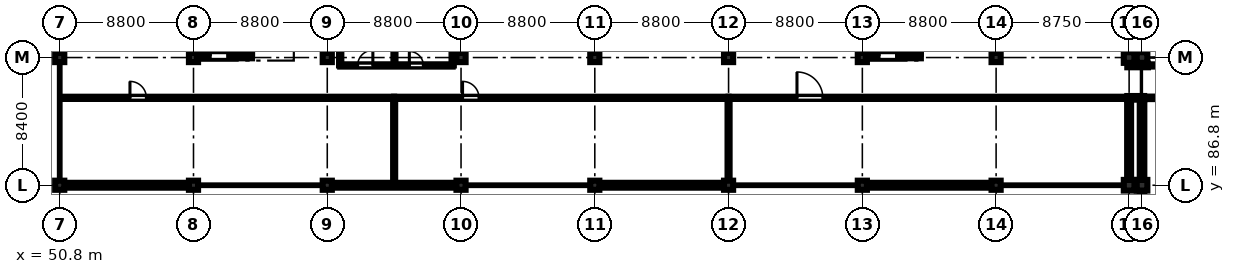
"""IFC4 building model, lengths in metres.
Left out: names, types, materials, properties, quantities, classifications, styles, units other than length and angle.
Written with IfcOpenShell. Run it as: python <this file> out.ifc"""

import sys

from ifc_helpers import new_model, si_unit, direction, frame, frame_2d, origin, origin_2d, place, context, subcontext, project, spatial, rectangle, extrude, element, fill, save


model = new_model("IFC4")
c1 = context("Model", 3, precision=1e-05, world=origin(), true_north=direction((0.0, 1.0)))
c2 = subcontext(c1, "Body", "Model", "MODEL_VIEW")
j1 = project(units=[si_unit("LENGTHUNIT", "METRE"), si_unit("PLANEANGLEUNIT", "RADIAN")], contexts=[c1])
p1 = place(None, origin())
s1 = spatial("IfcSite", under=j1, at=p1, CompositionType="ELEMENT")
p2 = place(p1, origin())
s2 = spatial("IfcBuilding", under=s1, at=p2, CompositionType="ELEMENT")
p3 = place(p2, frame((0.0, 0.0, 10.2)))
s3 = spatial("IfcBuildingStorey", under=s2, at=p3, CompositionType="ELEMENT", Elevation=10.2)
for number, where, z_axis, x_axis in (
    (1, (50.8, 86.8, 0.0), (0.0, 0.0, 1.0), (1.0, 0.0, 0.0)),
    (2, (50.8, 95.2, 0.0), (0.0, 0.0, 1.0), (1.0, 0.0, 0.0)),
    (3, (59.6, 86.8, 0.0), (0.0, 0.0, 1.0), (1.0, 0.0, 0.0)),
    (4, (59.6, 95.2, 0.0), (0.0, 0.0, 1.0), (1.0, 0.0, 0.0)),
    (5, (68.4, 86.8, 0.0), (0.0, 0.0, 1.0), (1.0, 0.0, 0.0)),
    (6, (68.4, 95.2, 0.0), (0.0, 0.0, 1.0), (1.0, 0.0, 0.0)),
    (7, (77.2, 86.8, 0.0), (0.0, 0.0, 1.0), (1.0, 0.0, 0.0)),
    (8, (77.2, 95.2, 0.0), (0.0, 0.0, 1.0), (1.0, 0.0, 0.0)),
    (9, (86.0, 86.8, 0.0), (0.0, 0.0, 1.0), (1.0, 0.0, 0.0)),
    (10, (86.0, 95.2, 0.0), (0.0, 0.0, 1.0), (1.0, 0.0, 0.0)),
    (11, (94.8, 86.8, 0.0), (0.0, 0.0, 1.0), (1.0, 0.0, 0.0)),
    (12, (94.8, 95.2, 0.0), (0.0, 0.0, 1.0), (1.0, 0.0, 0.0)),
    (13, (103.6, 86.8, 0.0), (0.0, 0.0, 1.0), (1.0, 0.0, 0.0)),
    (14, (103.6, 95.2, 0.0), (0.0, 0.0, 1.0), (1.0, 0.0, 0.0)),
    (15, (112.4, 86.8, 0.0), (0.0, 0.0, 1.0), (1.0, 0.0, 0.0)),
    (16, (112.4, 95.2, 0.0), (0.0, 0.0, 1.0), (1.0, 0.0, 0.0)),
):
    element("IfcColumn", number, at=place(p3, frame(where, z_axis=z_axis, x_axis=x_axis)), inside=s3, PredefinedType="COLUMN", context=c2, shape_type="SweptSolid", body=[
        extrude(rectangle(XDim=0.6, YDim=0.6, at=origin_2d()), origin(), (0.0, 0.0, 1.0), 4.26),
    ])
for number, where, z_axis, x_axis in (
    (17, (121.15, 86.8, 0.0), (0.0, 0.0, 1.0), (1.0, 0.0, 0.0)),
    (18, (121.15, 95.2, 0.0), (0.0, 0.0, 1.0), (1.0, 0.0, 0.0)),
    (19, (122.0, 86.8, 0.0), (0.0, 0.0, 1.0), (1.0, 0.0, 0.0)),
    (20, (122.0, 95.2, 0.0), (0.0, 0.0, 1.0), (1.0, 0.0, 0.0)),
):
    element("IfcColumn", number, at=place(p3, frame(where, z_axis=z_axis, x_axis=x_axis)), inside=s3, PredefinedType="COLUMN", context=c2, shape_type="SweptSolid", body=[
        extrude(rectangle(XDim=0.7, YDim=0.7, at=origin_2d()), origin(), (0.0, 0.0, 1.0), 4.26),
    ])
p4 = place(p3, frame((59.75, 95.3, 0.0), z_axis=(0.0, 0.0, 1.0), x_axis=(1.0, 0.0, 0.0)))
e21 = element("IfcWall", 21, at=p4, inside=s3, PredefinedType="SHEAR", context=c2, shape_type="SweptSolid", body=[
    extrude(rectangle(XDim=3.7, YDim=0.3, at=frame_2d((1.85, 0.0))), origin(), (0.0, 0.0, 1.0), 4.26),
])
p5 = place(p4, frame((0.95, 0.0, 0.0)))
e22 = element("IfcOpeningElement", 22, at=p5, cuts=e21, PredefinedType="OPENING", context=c2, shape_type="SweptSolid", body=[
    extrude(rectangle(XDim=1.15, YDim=2.15, at=frame_2d((0.575, 1.075))), frame((0.0, 0.16, 0.0), z_axis=(0.0, -1.0, 0.0), x_axis=(1.0, 0.0, 0.0)), (0.0, 0.0, 1.0), 0.32),
])
for number, where, z_axis, x_axis in (
    (23, (59.9, 95.45, 0.0), (0.0, 0.0, 1.0), (0.0, 1.0, 0.0)),
    (24, (63.3, 95.45, 0.0), (0.0, 0.0, 1.0), (0.0, 1.0, 0.0)),
):
    element("IfcWall", number, at=place(p3, frame(where, z_axis=z_axis, x_axis=x_axis)), inside=s3, PredefinedType="SHEAR", context=c2, shape_type="SweptSolid", body=[
        extrude(rectangle(XDim=7.9, YDim=0.3, at=frame_2d((3.95, 0.0))), origin(), (0.0, 0.0, 1.0), 4.26),
    ])
p6 = place(p3, frame((103.75, 95.3, 0.0), z_axis=(0.0, 0.0, 1.0), x_axis=(1.0, 0.0, 0.0)))
e25 = element("IfcWall", 25, at=p6, inside=s3, PredefinedType="SHEAR", context=c2, shape_type="SweptSolid", body=[
    extrude(rectangle(XDim=3.7, YDim=0.3, at=frame_2d((1.85, 0.0))), origin(), (0.0, 0.0, 1.0), 4.26),
])
p7 = place(p6, frame((0.95, 0.0, 0.0)))
e26 = element("IfcOpeningElement", 26, at=p7, cuts=e25, PredefinedType="OPENING", context=c2, shape_type="SweptSolid", body=[
    extrude(rectangle(XDim=1.15, YDim=2.15, at=frame_2d((0.575, 1.075))), frame((0.0, 0.16, 0.0), z_axis=(0.0, -1.0, 0.0), x_axis=(1.0, 0.0, 0.0)), (0.0, 0.0, 1.0), 0.32),
])
for number, where, z_axis, x_axis in (
    (27, (103.9, 95.45, 0.0), (0.0, 0.0, 1.0), (0.0, 1.0, 0.0)),
    (28, (107.3, 95.45, 0.0), (0.0, 0.0, 1.0), (0.0, 1.0, 0.0)),
):
    element("IfcWall", number, at=place(p3, frame(where, z_axis=z_axis, x_axis=x_axis)), inside=s3, PredefinedType="SHEAR", context=c2, shape_type="SweptSolid", body=[
        extrude(rectangle(XDim=7.9, YDim=0.3, at=frame_2d((3.95, 0.0))), origin(), (0.0, 0.0, 1.0), 4.26),
    ])
p8 = place(p3, frame((59.3, 86.8, 0.0), z_axis=(0.0, 0.0, 1.0), x_axis=(-1.0, 0.0, 0.0)))
e29 = element("IfcWall", 29, at=p8, inside=s3, PredefinedType="STANDARD", context=c2, shape_type="SweptSolid", body=[
    extrude(rectangle(XDim=8.2, YDim=0.32, at=frame_2d((4.1, 0.0))), origin(), (0.0, 0.0, 1.0), 3.61),
])
p9 = place(p8, frame((2.8, 0.0, 0.95)))
e30 = element("IfcOpeningElement", 30, at=p9, cuts=e29, PredefinedType="OPENING", context=c2, shape_type="SweptSolid", body=[
    extrude(rectangle(XDim=1.95, YDim=2.15, at=frame_2d((0.975, 1.075))), frame((0.0, 0.17, 0.0), z_axis=(0.0, -1.0, 0.0), x_axis=(1.0, 0.0, 0.0)), (0.0, 0.0, 1.0), 0.34),
])
p10 = place(p3, frame((76.9, 86.8, 0.0), z_axis=(0.0, 0.0, 1.0), x_axis=(-1.0, 0.0, 0.0)))
e31 = element("IfcWall", 31, at=p10, inside=s3, PredefinedType="STANDARD", context=c2, shape_type="SweptSolid", body=[
    extrude(rectangle(XDim=8.2, YDim=0.32, at=frame_2d((4.1, 0.0))), origin(), (0.0, 0.0, 1.0), 3.61),
])
p11 = place(p10, frame((1.2, 0.0, 0.95)))
e32 = element("IfcOpeningElement", 32, at=p11, cuts=e31, PredefinedType="OPENING", context=c2, shape_type="SweptSolid", body=[
    extrude(rectangle(XDim=1.95, YDim=2.15, at=frame_2d((0.975, 1.075))), frame((0.0, 0.17, 0.0), z_axis=(0.0, -1.0, 0.0), x_axis=(1.0, 0.0, 0.0)), (0.0, 0.0, 1.0), 0.34),
])
p12 = place(p3, frame((94.5, 86.8, 0.0), z_axis=(0.0, 0.0, 1.0), x_axis=(-1.0, 0.0, 0.0)))
e33 = element("IfcWall", 33, at=p12, inside=s3, PredefinedType="STANDARD", context=c2, shape_type="SweptSolid", body=[
    extrude(rectangle(XDim=8.2, YDim=0.32, at=frame_2d((4.1, 0.0))), origin(), (0.0, 0.0, 1.0), 3.61),
])
p13 = place(p12, frame((2.8, 0.0, 0.95)))
e34 = element("IfcOpeningElement", 34, at=p13, cuts=e33, PredefinedType="OPENING", context=c2, shape_type="SweptSolid", body=[
    extrude(rectangle(XDim=1.95, YDim=2.15, at=frame_2d((0.975, 1.075))), frame((0.0, 0.17, 0.0), z_axis=(0.0, -1.0, 0.0), x_axis=(1.0, 0.0, 0.0)), (0.0, 0.0, 1.0), 0.34),
])
p14 = place(p3, frame((112.1, 86.8, 0.0), z_axis=(0.0, 0.0, 1.0), x_axis=(-1.0, 0.0, 0.0)))
e35 = element("IfcWall", 35, at=p14, inside=s3, PredefinedType="STANDARD", context=c2, shape_type="SweptSolid", body=[
    extrude(rectangle(XDim=8.2, YDim=0.32, at=frame_2d((4.1, 0.0))), origin(), (0.0, 0.0, 1.0), 3.61),
])
p15 = place(p14, frame((2.8, 0.0, 0.95)))
e36 = element("IfcOpeningElement", 36, at=p15, cuts=e35, PredefinedType="OPENING", context=c2, shape_type="SweptSolid", body=[
    extrude(rectangle(XDim=1.95, YDim=2.15, at=frame_2d((0.975, 1.075))), frame((0.0, 0.17, 0.0), z_axis=(0.0, -1.0, 0.0), x_axis=(1.0, 0.0, 0.0)), (0.0, 0.0, 1.0), 0.34),
])
p16 = place(p3, frame((121.15, 92.42, 0.0), z_axis=(0.0, 0.0, 1.0), x_axis=(0.0, -1.0, 0.0)))
e37 = element("IfcWall", 37, at=p16, inside=s3, PredefinedType="STANDARD", context=c2, shape_type="SweptSolid", body=[
    extrude(rectangle(XDim=5.27, YDim=0.26, at=frame_2d((2.635, 0.0))), origin(), (0.0, 0.0, 1.0), 3.61),
])
p17 = place(p3, frame((121.15, 103.25, 0.0), z_axis=(0.0, 0.0, 1.0), x_axis=(0.0, -1.0, 0.0)))
e38 = element("IfcWall", 38, at=p17, inside=s3, PredefinedType="STANDARD", context=c2, shape_type="SweptSolid", body=[
    extrude(rectangle(XDim=7.7, YDim=0.26, at=frame_2d((3.85, 0.0))), origin(), (0.0, 0.0, 1.0), 3.61),
])
p18 = place(p3, frame((122.0, 78.75, 0.0), z_axis=(0.0, 0.0, 1.0), x_axis=(0.0, 1.0, 0.0)))
e39 = element("IfcWall", 39, at=p18, inside=s3, PredefinedType="STANDARD", context=c2, shape_type="SweptSolid", body=[
    extrude(rectangle(XDim=7.7, YDim=0.3, at=frame_2d((3.85, 0.0))), origin(), (0.0, 0.0, 1.0), 3.51),
])
p19 = place(p3, frame((122.0, 87.15, 0.0), z_axis=(0.0, 0.0, 1.0), x_axis=(0.0, 1.0, 0.0)))
e40 = element("IfcWall", 40, at=p19, inside=s3, PredefinedType="STANDARD", context=c2, shape_type="SweptSolid", body=[
    extrude(rectangle(XDim=5.27, YDim=0.3, at=frame_2d((2.635, 0.0))), origin(), (0.0, 0.0, 1.0), 3.51),
])
p20 = place(p3, frame((122.14, 92.55, 0.0), z_axis=(0.0, 0.0, 1.0), x_axis=(-1.0, 0.0, 0.0)))
e41 = element("IfcWall", 41, at=p20, inside=s3, PredefinedType="STANDARD", context=c2, shape_type="SweptSolid", body=[
    extrude(rectangle(XDim=1.11, YDim=0.24, at=frame_2d((0.555, 0.0))), origin(), (0.0, 0.0, 1.0), 4.26),
])
p21 = place(p3, frame((121.03, 94.68, 0.0), z_axis=(0.0, 0.0, 1.0), x_axis=(1.0, 0.0, 0.0)))
e42 = element("IfcWall", 42, at=p21, inside=s3, PredefinedType="STANDARD", context=c2, shape_type="SweptSolid", body=[
    extrude(rectangle(XDim=1.36, YDim=0.24, at=frame_2d((0.68, 0.0))), origin(), (0.0, 0.0, 1.0), 4.26),
])
p22 = place(p3, frame((122.0, 95.55, 0.0), z_axis=(0.0, 0.0, 1.0), x_axis=(0.0, 1.0, 0.0)))
e43 = element("IfcWall", 43, at=p22, inside=s3, PredefinedType="STANDARD", context=c2, shape_type="SweptSolid", body=[
    extrude(rectangle(XDim=7.7, YDim=0.3, at=frame_2d((3.85, 0.0))), origin(), (0.0, 0.0, 1.0), 3.51),
])
p23 = place(p3, frame((69.25, 94.68, 0.0), z_axis=(0.0, 0.0, 1.0), x_axis=(1.0, 0.0, 0.0)))
e44 = element("IfcWall", 44, at=p23, inside=s3, PredefinedType="PARTITIONING", context=c2, shape_type="SweptSolid", body=[
    extrude(rectangle(XDim=7.4, YDim=0.15, at=frame_2d((3.7, 0.0))), origin(), (0.0, 0.0, 1.0), 4.26),
])
p24 = place(p23, frame((1.15, 0.0, 0.0)))
e45 = element("IfcOpeningElement", 45, at=p24, cuts=e44, PredefinedType="OPENING", context=c2, shape_type="SweptSolid", body=[
    extrude(rectangle(XDim=1.0, YDim=2.12, at=frame_2d((0.5, 1.06))), frame((0.0, 0.085, 0.0), z_axis=(0.0, -1.0, 0.0), x_axis=(1.0, 0.0, 0.0)), (0.0, 0.0, 1.0), 0.17),
])
p25 = place(p23, frame((4.55, 0.0, 0.0)))
e46 = element("IfcOpeningElement", 46, at=p25, cuts=e44, PredefinedType="OPENING", context=c2, shape_type="SweptSolid", body=[
    extrude(rectangle(XDim=0.92, YDim=2.1, at=frame_2d((0.46, 1.05))), frame((0.0, 0.085, 0.0), z_axis=(0.0, -1.0, 0.0), x_axis=(1.0, 0.0, 0.0)), (0.0, 0.0, 1.0), 0.17),
])
p26 = place(p3, frame((69.25, 94.68, 0.0), z_axis=(0.0, 0.0, 1.0), x_axis=(0.0, 1.0, 0.0)))
e47 = element("IfcWall", 47, at=p26, inside=s3, PredefinedType="PARTITIONING", context=c2, shape_type="SweptSolid", body=[
    extrude(rectangle(XDim=8.57, YDim=0.15, at=frame_2d((4.285, 0.0))), origin(), (0.0, 0.0, 1.0), 4.26),
])
p27 = place(p3, frame((72.82, 94.68, 0.0), z_axis=(0.0, 0.0, 1.0), x_axis=(0.0, 1.0, 0.0)))
e48 = element("IfcWall", 48, at=p27, inside=s3, PredefinedType="PARTITIONING", context=c2, shape_type="SweptSolid", body=[
    extrude(rectangle(XDim=8.57, YDim=0.135, at=frame_2d((4.285, 0.0))), origin(), (0.0, 0.0, 1.0), 3.76),
])
p28 = place(p3, frame((76.65, 94.68, 0.0), z_axis=(0.0, 0.0, 1.0), x_axis=(0.0, 1.0, 0.0)))
e49 = element("IfcWall", 49, at=p28, inside=s3, PredefinedType="PARTITIONING", context=c2, shape_type="SweptSolid", body=[
    extrude(rectangle(XDim=8.57, YDim=0.15, at=frame_2d((4.285, 0.0))), origin(), (0.0, 0.0, 1.0), 4.26),
])
p29 = place(p3, frame((50.92, 92.55, 0.0), z_axis=(0.0, 0.0, 1.0), x_axis=(1.0, 0.0, 0.0)))
e50 = element("IfcWall", 50, at=p29, inside=s3, PredefinedType="PARTITIONING", context=c2, shape_type="SweptSolid", body=[
    extrude(rectangle(XDim=21.88, YDim=0.145, at=frame_2d((10.94, 0.0))), origin(), (0.0, 0.0, 1.0), 4.26),
])
p30 = place(p29, frame((4.5, 0.0, 0.0)))
e51 = element("IfcOpeningElement", 51, at=p30, cuts=e50, PredefinedType="OPENING", context=c2, shape_type="SweptSolid", body=[
    extrude(rectangle(XDim=1.08, YDim=2.15, at=frame_2d((0.54, 1.075))), frame((0.0, 0.083, 0.0), z_axis=(0.0, -1.0, 0.0), x_axis=(1.0, 0.0, 0.0)), (0.0, 0.0, 1.0), 0.165),
])
p31 = place(p3, frame((72.8, 92.55, 0.0), z_axis=(0.0, 0.0, 1.0), x_axis=(1.0, 0.0, 0.0)))
e52 = element("IfcWall", 52, at=p31, inside=s3, PredefinedType="PARTITIONING", context=c2, shape_type="SweptSolid", body=[
    extrude(rectangle(XDim=22.0, YDim=0.145, at=frame_2d((11.0, 0.0))), origin(), (0.0, 0.0, 1.0), 4.26),
])
p32 = place(p31, frame((4.5, 0.0, 0.0)))
e53 = element("IfcOpeningElement", 53, at=p32, cuts=e52, PredefinedType="OPENING", context=c2, shape_type="SweptSolid", body=[
    extrude(rectangle(XDim=1.08, YDim=2.15, at=frame_2d((0.54, 1.075))), frame((0.0, 0.083, 0.0), z_axis=(0.0, -1.0, 0.0), x_axis=(1.0, 0.0, 0.0)), (0.0, 0.0, 1.0), 0.165),
])
p33 = place(p3, frame((72.8, 86.95, 0.0), z_axis=(0.0, 0.0, 1.0), x_axis=(0.0, 1.0, 0.0)))
e54 = element("IfcWall", 54, at=p33, inside=s3, PredefinedType="PARTITIONING", context=c2, shape_type="SweptSolid", body=[
    extrude(rectangle(XDim=5.6, YDim=0.135, at=frame_2d((2.8, 0.0))), origin(), (0.0, 0.0, 1.0), 3.76),
])
p34 = place(p3, frame((94.8, 92.55, 0.0), z_axis=(0.0, 0.0, 1.0), x_axis=(1.0, 0.0, 0.0)))
e55 = element("IfcWall", 55, at=p34, inside=s3, PredefinedType="PARTITIONING", context=c2, shape_type="SweptSolid", body=[
    extrude(rectangle(XDim=26.22, YDim=0.145, at=frame_2d((13.11, 0.0))), origin(), (0.0, 0.0, 1.0), 4.26),
])
p35 = place(p34, frame((4.5, 0.0, 0.0)))
e56 = element("IfcOpeningElement", 56, at=p35, cuts=e55, PredefinedType="OPENING", context=c2, shape_type="SweptSolid", body=[
    extrude(rectangle(XDim=1.7, YDim=2.2, at=frame_2d((0.85, 1.1))), frame((0.0, 0.083, 0.0), z_axis=(0.0, -1.0, 0.0), x_axis=(1.0, 0.0, 0.0)), (0.0, 0.0, 1.0), 0.165),
])
p36 = place(p3, frame((94.8, 86.95, 0.0), z_axis=(0.0, 0.0, 1.0), x_axis=(0.0, 1.0, 0.0)))
e57 = element("IfcWall", 57, at=p36, inside=s3, PredefinedType="PARTITIONING", context=c2, shape_type="SweptSolid", body=[
    extrude(rectangle(XDim=5.6, YDim=0.135, at=frame_2d((2.8, 0.0))), origin(), (0.0, 0.0, 1.0), 3.61),
])
p37 = place(p3, frame((122.4, 94.68, 0.0), z_axis=(0.0, 0.0, 1.0), x_axis=(1.0, 0.0, 0.0)))
e58 = element("IfcWall", 58, at=p37, inside=s3, PredefinedType="PARTITIONING", context=c2, shape_type="SweptSolid", body=[
    extrude(rectangle(XDim=13.8, YDim=0.145, at=frame_2d((6.9, 0.0))), origin(), (0.0, 0.0, 1.0), 4.26),
])
p38 = place(p37, frame((3.2, 0.0, 0.0)))
e59 = element("IfcOpeningElement", 59, at=p38, cuts=e58, PredefinedType="OPENING", context=c2, shape_type="SweptSolid", body=[
    extrude(rectangle(XDim=1.02, YDim=2.15, at=frame_2d((0.51, 1.075))), frame((0.0, 0.083, 0.0), z_axis=(0.0, -1.0, 0.0), x_axis=(1.0, 0.0, 0.0)), (0.0, 0.0, 1.0), 0.165),
])
p39 = place(p3, frame((122.15, 92.55, 0.0), z_axis=(0.0, 0.0, 1.0), x_axis=(1.0, 0.0, 0.0)))
e60 = element("IfcWall", 60, at=p39, inside=s3, PredefinedType="PARTITIONING", context=c2, shape_type="SweptSolid", body=[
    extrude(rectangle(XDim=16.65, YDim=0.165, at=frame_2d((8.325, 0.0))), origin(), (0.0, 0.0, 1.0), 4.26),
])
p40 = place(p39, frame((3.75, 0.0, 0.0)))
e61 = element("IfcOpeningElement", 61, at=p40, cuts=e60, PredefinedType="OPENING", context=c2, shape_type="SweptSolid", body=[
    extrude(rectangle(XDim=1.7, YDim=2.2, at=frame_2d((0.85, 1.1))), frame((0.0, 0.093, 0.0), z_axis=(0.0, -1.0, 0.0), x_axis=(1.0, 0.0, 0.0)), (0.0, 0.0, 1.0), 0.185),
])
p41 = place(p9, origin())
e62 = element("IfcWindow", 62, at=p41, inside=s3, PartitioningType="DOUBLE_PANEL_VERTICAL", PredefinedType="WINDOW", context=c2, shape_type="SweptSolid", body=[
    extrude(rectangle(XDim=1.95, YDim=2.15, at=frame_2d((0.975, 1.075))), frame((0.0, 0.03, 0.0), z_axis=(0.0, -1.0, 0.0), x_axis=(1.0, 0.0, 0.0)), (0.0, 0.0, 1.0), 0.06),
])
fill(e30, e62)
p42 = place(p11, origin())
e63 = element("IfcWindow", 63, at=p42, inside=s3, PartitioningType="DOUBLE_PANEL_VERTICAL", PredefinedType="WINDOW", context=c2, shape_type="SweptSolid", body=[
    extrude(rectangle(XDim=1.95, YDim=2.15, at=frame_2d((0.975, 1.075))), frame((0.0, 0.03, 0.0), z_axis=(0.0, -1.0, 0.0), x_axis=(1.0, 0.0, 0.0)), (0.0, 0.0, 1.0), 0.06),
])
fill(e32, e63)
p43 = place(p13, origin())
e64 = element("IfcWindow", 64, at=p43, inside=s3, PartitioningType="DOUBLE_PANEL_VERTICAL", PredefinedType="WINDOW", context=c2, shape_type="SweptSolid", body=[
    extrude(rectangle(XDim=1.95, YDim=2.15, at=frame_2d((0.975, 1.075))), frame((0.0, 0.03, 0.0), z_axis=(0.0, -1.0, 0.0), x_axis=(1.0, 0.0, 0.0)), (0.0, 0.0, 1.0), 0.06),
])
fill(e34, e64)
p44 = place(p15, origin())
e65 = element("IfcWindow", 65, at=p44, inside=s3, PartitioningType="DOUBLE_PANEL_VERTICAL", PredefinedType="WINDOW", context=c2, shape_type="SweptSolid", body=[
    extrude(rectangle(XDim=1.95, YDim=2.15, at=frame_2d((0.975, 1.075))), frame((0.0, 0.03, 0.0), z_axis=(0.0, -1.0, 0.0), x_axis=(1.0, 0.0, 0.0)), (0.0, 0.0, 1.0), 0.06),
])
fill(e36, e65)
p45 = place(p24, origin())
e66 = element("IfcDoor", 66, at=p45, inside=s3, OperationType="SINGLE_SWING_RIGHT", PredefinedType="DOOR", context=c2, shape_type="SweptSolid", body=[
    extrude(rectangle(XDim=1.0, YDim=2.12, at=frame_2d((0.5, 1.06))), frame((0.0, 0.025, 0.0), z_axis=(0.0, -1.0, 0.0), x_axis=(1.0, 0.0, 0.0)), (0.0, 0.0, 1.0), 0.05),
])
fill(e45, e66)
p46 = place(p25, origin())
e67 = element("IfcDoor", 67, at=p46, inside=s3, OperationType="SINGLE_SWING_LEFT", PredefinedType="DOOR", context=c2, shape_type="SweptSolid", body=[
    extrude(rectangle(XDim=0.92, YDim=2.1, at=frame_2d((0.46, 1.05))), frame((0.0, 0.025, 0.0), z_axis=(0.0, -1.0, 0.0), x_axis=(1.0, 0.0, 0.0)), (0.0, 0.0, 1.0), 0.05),
])
fill(e46, e67)
p47 = place(p30, origin())
e68 = element("IfcDoor", 68, at=p47, inside=s3, OperationType="SINGLE_SWING_LEFT", PredefinedType="DOOR", context=c2, shape_type="SweptSolid", body=[
    extrude(rectangle(XDim=1.08, YDim=2.15, at=frame_2d((0.54, 1.075))), frame((0.0, 0.025, 0.0), z_axis=(0.0, -1.0, 0.0), x_axis=(1.0, 0.0, 0.0)), (0.0, 0.0, 1.0), 0.05),
])
fill(e51, e68)
p48 = place(p32, origin())
e69 = element("IfcDoor", 69, at=p48, inside=s3, OperationType="SINGLE_SWING_LEFT", PredefinedType="DOOR", context=c2, shape_type="SweptSolid", body=[
    extrude(rectangle(XDim=1.08, YDim=2.15, at=frame_2d((0.54, 1.075))), frame((0.0, 0.025, 0.0), z_axis=(0.0, -1.0, 0.0), x_axis=(1.0, 0.0, 0.0)), (0.0, 0.0, 1.0), 0.05),
])
fill(e53, e69)
p49 = place(p35, origin())
e70 = element("IfcDoor", 70, at=p49, inside=s3, OperationType="SINGLE_SWING_LEFT", PredefinedType="DOOR", context=c2, shape_type="SweptSolid", body=[
    extrude(rectangle(XDim=1.7, YDim=2.2, at=frame_2d((0.85, 1.1))), frame((0.0, 0.025, 0.0), z_axis=(0.0, -1.0, 0.0), x_axis=(1.0, 0.0, 0.0)), (0.0, 0.0, 1.0), 0.05),
])
fill(e56, e70)
p50 = place(p5, origin())
e71 = element("IfcDoor", 71, at=p50, inside=s3, OperationType="SINGLE_SWING_LEFT", PredefinedType="DOOR", context=c2, shape_type="SweptSolid", body=[
    extrude(rectangle(XDim=1.15, YDim=2.15, at=frame_2d((0.575, 1.075))), frame((0.0, 0.025, 0.0), z_axis=(0.0, -1.0, 0.0), x_axis=(1.0, 0.0, 0.0)), (0.0, 0.0, 1.0), 0.05),
])
fill(e22, e71)
p51 = place(p7, origin())
e72 = element("IfcDoor", 72, at=p51, inside=s3, OperationType="SINGLE_SWING_LEFT", PredefinedType="DOOR", context=c2, shape_type="SweptSolid", body=[
    extrude(rectangle(XDim=1.15, YDim=2.15, at=frame_2d((0.575, 1.075))), frame((0.0, 0.025, 0.0), z_axis=(0.0, -1.0, 0.0), x_axis=(1.0, 0.0, 0.0)), (0.0, 0.0, 1.0), 0.05),
])
fill(e26, e72)
save(model, sys.argv[1])
